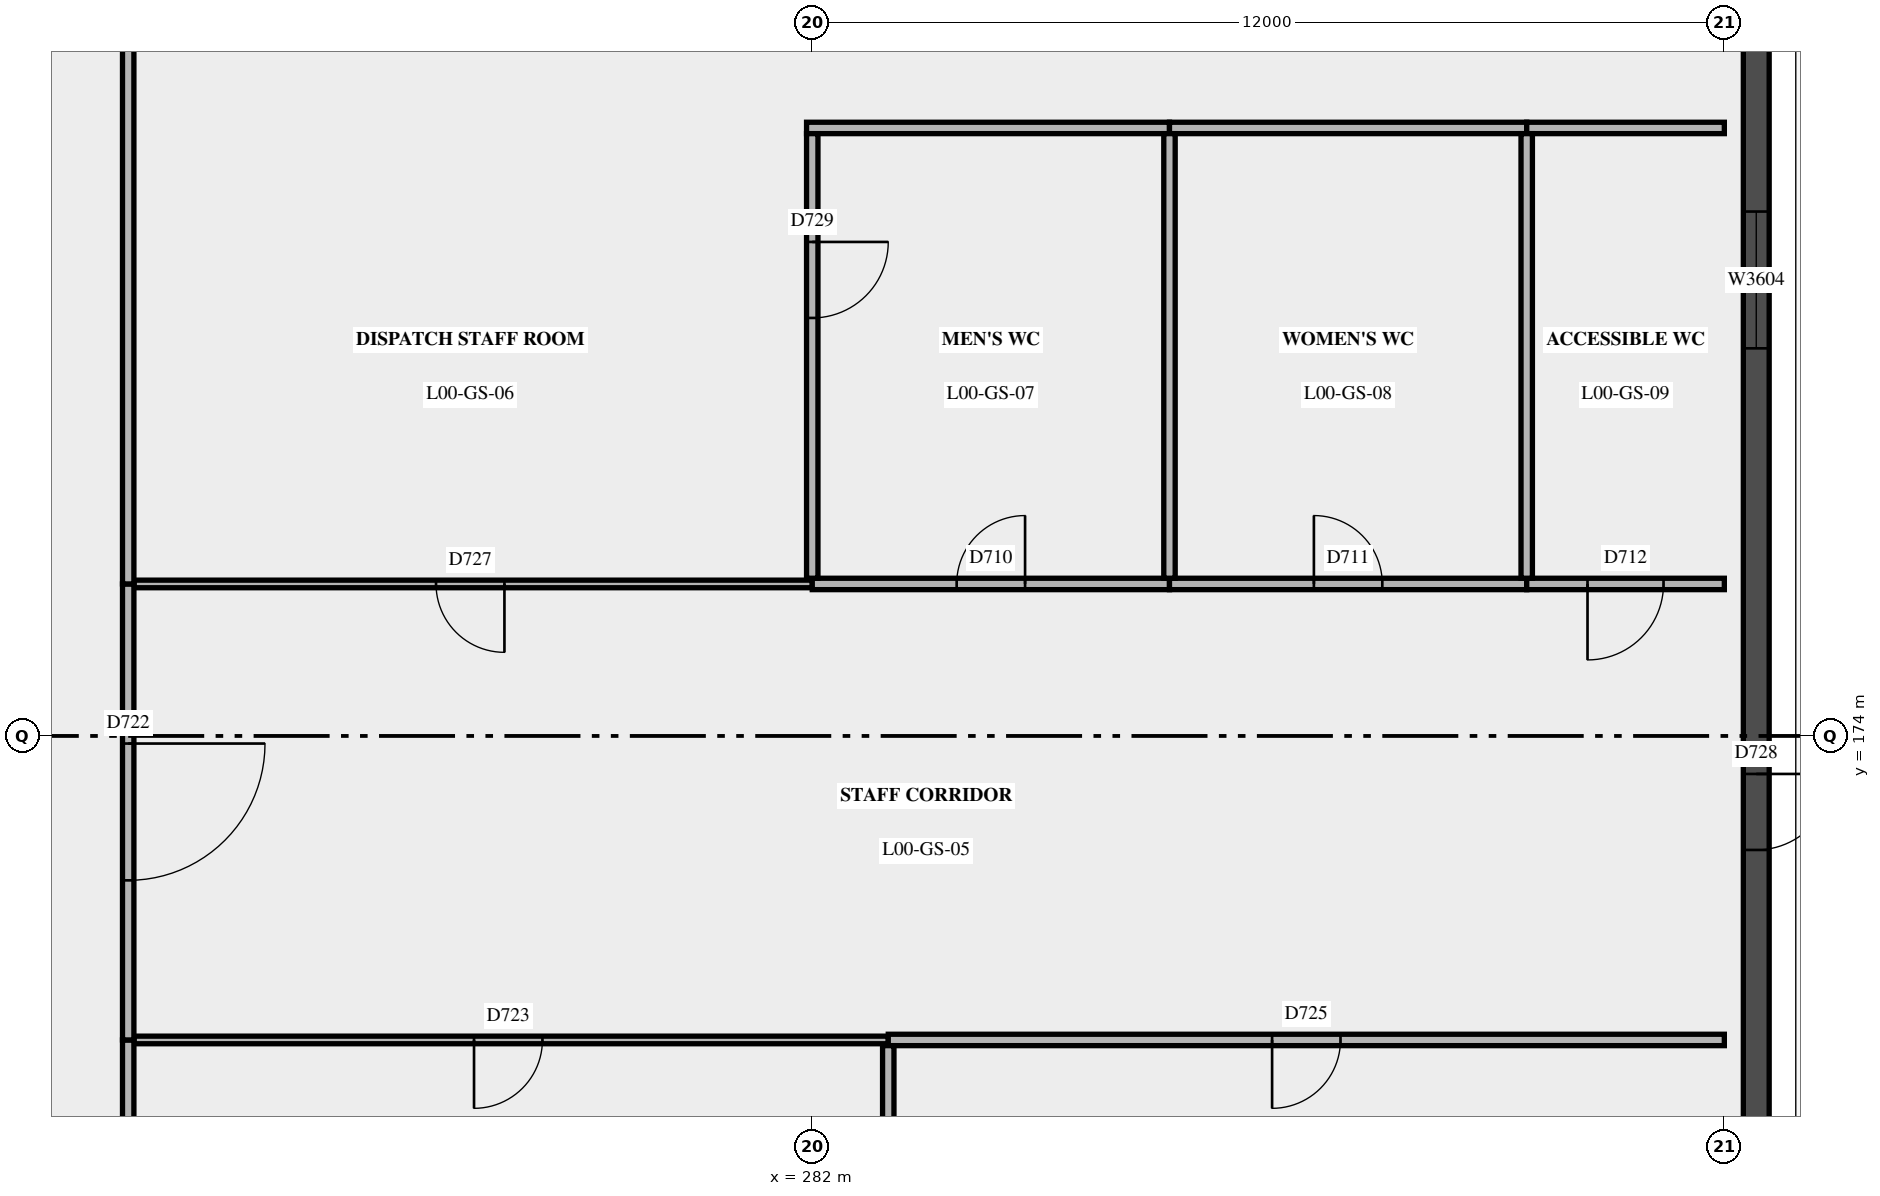
"""IFC4 building model, lengths in metres.
Left out: names, types, materials, properties, quantities, classifications, styles, units other than length and angle.
Written with IfcOpenShell. Run it as: python <this file> out.ifc"""

import sys

from ifc_helpers import new_model, si_unit, direction, frame, frame_2d, origin, place, context, subcontext, project, spatial, polyline, rectangle, outline, extrude, element, fill, save


model = new_model("IFC4")
c1 = context("Model", 3, precision=1e-05, world=origin(), true_north=direction((0.0, 1.0)))
c2 = subcontext(c1, "Body", "Model", "MODEL_VIEW")
j1 = project(units=[si_unit("LENGTHUNIT", "METRE"), si_unit("PLANEANGLEUNIT", "RADIAN")], contexts=[c1])
p1 = place(None, origin())
s1 = spatial("IfcSite", under=j1, at=p1, CompositionType="ELEMENT")
p2 = place(p1, origin())
s2 = spatial("IfcBuilding", under=s1, at=p2, CompositionType="ELEMENT")
p3 = place(p2, origin())
s3 = spatial("IfcBuildingStorey", under=s2, at=p3, CompositionType="ELEMENT", Elevation=0.0)
p4 = place(p3, frame((294.42, 161.75, 0.0), z_axis=(0.0, 0.0, 1.0), x_axis=(0.0, 1.0, 0.0)))
e1 = element("IfcWall", 1, at=p4, inside=s3, PredefinedType="SOLIDWALL", context=c2, shape_type="SweptSolid", body=[
    extrude(rectangle(XDim=24.5, YDim=0.34, at=frame_2d((12.25, 0.0))), origin(), (0.0, 0.0, 1.0), 5.4),
])
p5 = place(p4, frame((11.75, 0.0, 0.0), z_axis=(0.0, 0.0, 1.0), x_axis=(-1.0, 0.0, 0.0)))
e2 = element("IfcOpeningElement", 2, at=p5, cuts=e1, PredefinedType="OPENING", context=c2, shape_type="SweptSolid", body=[
    extrude(rectangle(XDim=1.0, YDim=2.1, at=frame_2d((0.5, 1.05))), frame((0.0, 0.18, 0.0), z_axis=(0.0, -1.0, 0.0), x_axis=(1.0, 0.0, 0.0)), (0.0, 0.0, 1.0), 0.36),
])
p6 = place(p4, frame((5.35, 0.0, 0.9)))
e3 = element("IfcOpeningElement", 3, at=p6, cuts=e1, PredefinedType="OPENING", context=c2, shape_type="SweptSolid", body=[
    extrude(rectangle(XDim=1.8, YDim=2.4, at=frame_2d((0.9, 1.2))), frame((0.0, 0.18, 0.0), z_axis=(0.0, -1.0, 0.0), x_axis=(1.0, 0.0, 0.0)), (0.0, 0.0, 1.0), 0.36),
])
p7 = place(p4, frame((17.35, 0.0, 0.9)))
e4 = element("IfcOpeningElement", 4, at=p7, cuts=e1, PredefinedType="OPENING", context=c2, shape_type="SweptSolid", body=[
    extrude(rectangle(XDim=1.8, YDim=2.4, at=frame_2d((0.9, 1.2))), frame((0.0, 0.18, 0.0), z_axis=(0.0, -1.0, 0.0), x_axis=(1.0, 0.0, 0.0)), (0.0, 0.0, 1.0), 0.36),
])
p8 = place(p3, frame((273.075, 170.0, 0.0), z_axis=(0.0, 0.0, 1.0), x_axis=(1.0, 0.0, 0.0)))
e5 = element("IfcWall", 5, at=p8, inside=s3, PredefinedType="PARTITIONING", context=c2, shape_type="SweptSolid", body=[
    extrude(rectangle(XDim=9.925, YDim=0.1, at=frame_2d((4.962, 0.0))), origin(), (0.0, 0.0, 1.0), 6.9),
])
p9 = place(p8, frame((4.475, 0.0, 0.0)))
e6 = element("IfcOpeningElement", 6, at=p9, cuts=e5, PredefinedType="OPENING", context=c2, shape_type="SweptSolid", body=[
    extrude(rectangle(XDim=0.9, YDim=2.1, at=frame_2d((0.45, 1.05))), frame((0.0, 0.06, 0.0), z_axis=(0.0, -1.0, 0.0), x_axis=(1.0, 0.0, 0.0)), (0.0, 0.0, 1.0), 0.12),
])
p10 = place(p3, frame((283.0, 170.0, 0.0), z_axis=(0.0, 0.0, 1.0), x_axis=(1.0, 0.0, 0.0)))
e7 = element("IfcWall", 7, at=p10, inside=s3, PredefinedType="PARTITIONING", context=c2, shape_type="SweptSolid", body=[
    extrude(rectangle(XDim=11.0, YDim=0.15, at=frame_2d((5.5, 0.0))), origin(), (0.0, 0.0, 1.0), 6.9),
])
p11 = place(p10, frame((5.05, 0.0, 0.0)))
e8 = element("IfcOpeningElement", 8, at=p11, cuts=e7, PredefinedType="OPENING", context=c2, shape_type="SweptSolid", body=[
    extrude(rectangle(XDim=0.9, YDim=2.1, at=frame_2d((0.45, 1.05))), frame((0.0, 0.085, 0.0), z_axis=(0.0, -1.0, 0.0), x_axis=(1.0, 0.0, 0.0)), (0.0, 0.0, 1.0), 0.17),
])
p12 = place(p3, frame((273.075, 176.0, 0.0), z_axis=(0.0, 0.0, 1.0), x_axis=(1.0, 0.0, 0.0)))
e9 = element("IfcWall", 9, at=p12, inside=s3, PredefinedType="PARTITIONING", context=c2, shape_type="SweptSolid", body=[
    extrude(rectangle(XDim=8.925, YDim=0.1, at=frame_2d((4.462, 0.0))), origin(), (0.0, 0.0, 1.0), 6.9),
])
p13 = place(p12, frame((3.975, 0.0, 0.0)))
e10 = element("IfcOpeningElement", 10, at=p13, cuts=e9, PredefinedType="OPENING", context=c2, shape_type="SweptSolid", body=[
    extrude(rectangle(XDim=0.9, YDim=2.1, at=frame_2d((0.45, 1.05))), frame((0.0, 0.06, 0.0), z_axis=(0.0, -1.0, 0.0), x_axis=(1.0, 0.0, 0.0)), (0.0, 0.0, 1.0), 0.12),
])
p14 = place(p3, frame((282.0, 176.0, 0.0), z_axis=(0.0, 0.0, 1.0), x_axis=(1.0, 0.0, 0.0)))
e11 = element("IfcWall", 11, at=p14, inside=s3, PredefinedType="PARTITIONING", context=c2, shape_type="SweptSolid", body=[
    extrude(rectangle(XDim=4.7, YDim=0.15, at=frame_2d((2.35, 0.0))), origin(), (0.0, 0.0, 1.0), 5.15),
])
p15 = place(p14, frame((1.9, 0.0, 0.0)))
e12 = element("IfcOpeningElement", 12, at=p15, cuts=e11, PredefinedType="OPENING", context=c2, shape_type="SweptSolid", body=[
    extrude(rectangle(XDim=0.9, YDim=2.1, at=frame_2d((0.45, 1.05))), frame((0.0, 0.085, 0.0), z_axis=(0.0, -1.0, 0.0), x_axis=(1.0, 0.0, 0.0)), (0.0, 0.0, 1.0), 0.17),
])
p16 = place(p3, frame((286.7, 176.0, 0.0), z_axis=(0.0, 0.0, 1.0), x_axis=(1.0, 0.0, 0.0)))
e13 = element("IfcWall", 13, at=p16, inside=s3, PredefinedType="PARTITIONING", context=c2, shape_type="SweptSolid", body=[
    extrude(rectangle(XDim=4.7, YDim=0.15, at=frame_2d((2.35, 0.0))), origin(), (0.0, 0.0, 1.0), 5.15),
])
p17 = place(p16, frame((1.9, 0.0, 0.0)))
e14 = element("IfcOpeningElement", 14, at=p17, cuts=e13, PredefinedType="OPENING", context=c2, shape_type="SweptSolid", body=[
    extrude(rectangle(XDim=0.9, YDim=2.1, at=frame_2d((0.45, 1.05))), frame((0.0, 0.085, 0.0), z_axis=(0.0, -1.0, 0.0), x_axis=(1.0, 0.0, 0.0)), (0.0, 0.0, 1.0), 0.17),
])
p18 = place(p3, frame((291.4, 176.0, 0.0), z_axis=(0.0, 0.0, 1.0), x_axis=(1.0, 0.0, 0.0)))
e15 = element("IfcWall", 15, at=p18, inside=s3, PredefinedType="PARTITIONING", context=c2, shape_type="SweptSolid", body=[
    extrude(rectangle(XDim=2.6, YDim=0.15, at=frame_2d((1.3, 0.0))), origin(), (0.0, 0.0, 1.0), 5.15),
])
p19 = place(p18, frame((0.8, 0.0, 0.0)))
e16 = element("IfcOpeningElement", 16, at=p19, cuts=e15, PredefinedType="OPENING", context=c2, shape_type="SweptSolid", body=[
    extrude(rectangle(XDim=1.0, YDim=2.1, at=frame_2d((0.5, 1.05))), frame((0.0, 0.085, 0.0), z_axis=(0.0, -1.0, 0.0), x_axis=(1.0, 0.0, 0.0)), (0.0, 0.0, 1.0), 0.17),
])
p20 = place(p3, frame((281.925, 182.0, 0.0), z_axis=(0.0, 0.0, 1.0), x_axis=(1.0, 0.0, 0.0)))
e17 = element("IfcWall", 17, at=p20, inside=s3, PredefinedType="PARTITIONING", context=c2, shape_type="SweptSolid", body=[
    extrude(rectangle(XDim=4.775, YDim=0.15, at=frame_2d((2.387, 0.0))), origin(), (0.0, 0.0, 1.0), 5.15),
])
p21 = place(p3, frame((286.7, 182.0, 0.0), z_axis=(0.0, 0.0, 1.0), x_axis=(1.0, 0.0, 0.0)))
e18 = element("IfcWall", 18, at=p21, inside=s3, PredefinedType="PARTITIONING", context=c2, shape_type="SweptSolid", body=[
    extrude(rectangle(XDim=4.7, YDim=0.15, at=frame_2d((2.35, 0.0))), origin(), (0.0, 0.0, 1.0), 5.15),
])
p22 = place(p3, frame((291.4, 182.0, 0.0), z_axis=(0.0, 0.0, 1.0), x_axis=(1.0, 0.0, 0.0)))
e19 = element("IfcWall", 19, at=p22, inside=s3, PredefinedType="PARTITIONING", context=c2, shape_type="SweptSolid", body=[
    extrude(rectangle(XDim=2.6, YDim=0.15, at=frame_2d((1.3, 0.0))), origin(), (0.0, 0.0, 1.0), 5.15),
])
p23 = place(p3, frame((273.0, 162.0, 0.0), z_axis=(0.0, 0.0, 1.0), x_axis=(0.0, 1.0, 0.0)))
e20 = element("IfcWall", 20, at=p23, inside=s3, PredefinedType="PARTITIONING", context=c2, shape_type="SweptSolid", body=[
    extrude(outline(polyline([(0.0, 0.0), (8.0, 0.0), (8.0, 6.9), (0.09, 6.9), (0.085, 5.927), (0.0, 5.927), (0.0, 0.0)])), frame((0.0, 0.075, 0.0), z_axis=(0.0, -1.0, 0.0), x_axis=(1.0, 0.0, 0.0)), (0.0, 0.0, 1.0), 0.15),
])
p24 = place(p3, frame((273.0, 170.0, 0.0), z_axis=(0.0, 0.0, 1.0), x_axis=(0.0, 1.0, 0.0)))
e21 = element("IfcWall", 21, at=p24, inside=s3, PredefinedType="PARTITIONING", context=c2, shape_type="SweptSolid", body=[
    extrude(rectangle(XDim=6.0, YDim=0.15, at=frame_2d((3.0, 0.0))), origin(), (0.0, 0.0, 1.0), 6.9),
])
p25 = place(p24, frame((2.1, 0.0, 0.0)))
e22 = element("IfcOpeningElement", 22, at=p25, cuts=e21, PredefinedType="OPENING", context=c2, shape_type="SweptSolid", body=[
    extrude(rectangle(XDim=1.8, YDim=2.1, at=frame_2d((0.9, 1.05))), frame((0.0, 0.085, 0.0), z_axis=(0.0, -1.0, 0.0), x_axis=(1.0, 0.0, 0.0)), (0.0, 0.0, 1.0), 0.17),
])
p26 = place(p3, frame((273.0, 176.0, 0.0), z_axis=(0.0, 0.0, 1.0), x_axis=(0.0, 1.0, 0.0)))
e23 = element("IfcWall", 23, at=p26, inside=s3, PredefinedType="PARTITIONING", context=c2, shape_type="SweptSolid", body=[
    extrude(outline(polyline([(0.0, 0.0), (10.0, 0.0), (10.0, 5.927), (9.915, 5.927), (9.91, 6.9), (0.0, 6.9), (0.0, 0.0)])), frame((0.0, 0.075, 0.0), z_axis=(0.0, -1.0, 0.0), x_axis=(1.0, 0.0, 0.0)), (0.0, 0.0, 1.0), 0.15),
])
p27 = place(p3, frame((282.0, 176.075, 0.0), z_axis=(0.0, 0.0, 1.0), x_axis=(0.0, 1.0, 0.0)))
e24 = element("IfcWall", 24, at=p27, inside=s3, PredefinedType="PARTITIONING", context=c2, shape_type="SweptSolid", body=[
    extrude(rectangle(XDim=5.85, YDim=0.15, at=frame_2d((2.925, 0.0))), origin(), (0.0, 0.0, 1.0), 5.15),
])
p28 = place(p27, frame((4.425, 0.0, 0.0), z_axis=(0.0, 0.0, 1.0), x_axis=(-1.0, 0.0, 0.0)))
e25 = element("IfcOpeningElement", 25, at=p28, cuts=e24, PredefinedType="OPENING", context=c2, shape_type="SweptSolid", body=[
    extrude(rectangle(XDim=1.0, YDim=2.1, at=frame_2d((0.5, 1.05))), frame((0.0, 0.085, 0.0), z_axis=(0.0, -1.0, 0.0), x_axis=(1.0, 0.0, 0.0)), (0.0, 0.0, 1.0), 0.17),
])
p29 = place(p3, frame((283.0, 162.0, 0.0), z_axis=(0.0, 0.0, 1.0), x_axis=(0.0, 1.0, 0.0)))
e26 = element("IfcWall", 26, at=p29, inside=s3, PredefinedType="PARTITIONING", context=c2, shape_type="SweptSolid", body=[
    extrude(outline(polyline([(0.0, 0.0), (7.925, 0.0), (7.925, 6.9), (0.09, 6.9), (0.085, 5.927), (0.0, 5.927), (0.0, 0.0)])), frame((0.0, 0.075, 0.0), z_axis=(0.0, -1.0, 0.0), x_axis=(1.0, 0.0, 0.0)), (0.0, 0.0, 1.0), 0.15),
])
for number, where, z_axis, x_axis in (
    (27, (286.7, 176.075, 0.0), (0.0, 0.0, 1.0), (0.0, 1.0, 0.0)),
    (28, (291.4, 176.075, 0.0), (0.0, 0.0, 1.0), (0.0, 1.0, 0.0)),
):
    element("IfcWall", number, at=place(p3, frame(where, z_axis=z_axis, x_axis=x_axis)), inside=s3, PredefinedType="PARTITIONING", context=c2, shape_type="SweptSolid", body=[
        extrude(rectangle(XDim=5.85, YDim=0.15, at=frame_2d((2.925, 0.0))), origin(), (0.0, 0.0, 1.0), 5.15),
    ])
p30 = place(p5, origin())
e29 = element("IfcDoor", 29, at=p30, inside=s3, OperationType="SINGLE_SWING_LEFT", PredefinedType="DOOR", context=c2, shape_type="SweptSolid", body=[
    extrude(rectangle(XDim=1.0, YDim=2.1, at=frame_2d((0.5, 1.05))), frame((0.0, 0.025, 0.0), z_axis=(0.0, -1.0, 0.0), x_axis=(1.0, 0.0, 0.0)), (0.0, 0.0, 1.0), 0.05),
])
fill(e2, e29)
p31 = place(p7, origin())
e30 = element("IfcWindow", 30, at=p31, inside=s3, PartitioningType="SINGLE_PANEL", PredefinedType="WINDOW", context=c2, shape_type="SweptSolid", body=[
    extrude(rectangle(XDim=1.8, YDim=2.4, at=frame_2d((0.9, 1.2))), frame((0.0, 0.03, 0.0), z_axis=(0.0, -1.0, 0.0), x_axis=(1.0, 0.0, 0.0)), (0.0, 0.0, 1.0), 0.06),
])
fill(e4, e30)
p32 = place(p15, origin())
e31 = element("IfcDoor", 31, at=p32, inside=s3, OperationType="SINGLE_SWING_RIGHT", PredefinedType="DOOR", context=c2, shape_type="SweptSolid", body=[
    extrude(rectangle(XDim=0.9, YDim=2.1, at=frame_2d((0.45, 1.05))), frame((0.0, 0.025, 0.0), z_axis=(0.0, -1.0, 0.0), x_axis=(1.0, 0.0, 0.0)), (0.0, 0.0, 1.0), 0.05),
])
fill(e12, e31)
p33 = place(p17, origin())
e32 = element("IfcDoor", 32, at=p33, inside=s3, OperationType="SINGLE_SWING_LEFT", PredefinedType="DOOR", context=c2, shape_type="SweptSolid", body=[
    extrude(rectangle(XDim=0.9, YDim=2.1, at=frame_2d((0.45, 1.05))), frame((0.0, 0.025, 0.0), z_axis=(0.0, -1.0, 0.0), x_axis=(1.0, 0.0, 0.0)), (0.0, 0.0, 1.0), 0.05),
])
fill(e14, e32)
p34 = place(p19, origin())
e33 = element("IfcDoor", 33, at=p34, inside=s3, OperationType="SINGLE_SWING_RIGHT", PredefinedType="DOOR", context=c2, shape_type="SweptSolid", body=[
    extrude(rectangle(XDim=1.0, YDim=2.1, at=frame_2d((0.5, 1.05))), frame((0.0, 0.025, 0.0), z_axis=(0.0, -1.0, 0.0), x_axis=(1.0, 0.0, 0.0)), (0.0, 0.0, 1.0), 0.05),
])
fill(e16, e33)
p35 = place(p25, origin())
e34 = element("IfcDoor", 34, at=p35, inside=s3, OperationType="DOUBLE_DOOR_SINGLE_SWING", PredefinedType="DOOR", context=c2, shape_type="SweptSolid", body=[
    extrude(rectangle(XDim=1.8, YDim=2.1, at=frame_2d((0.9, 1.05))), frame((0.0, 0.025, 0.0), z_axis=(0.0, -1.0, 0.0), x_axis=(1.0, 0.0, 0.0)), (0.0, 0.0, 1.0), 0.05),
])
fill(e22, e34)
p36 = place(p9, origin())
e35 = element("IfcDoor", 35, at=p36, inside=s3, OperationType="SINGLE_SWING_RIGHT", PredefinedType="DOOR", context=c2, shape_type="SweptSolid", body=[
    extrude(rectangle(XDim=0.9, YDim=2.1, at=frame_2d((0.45, 1.05))), frame((0.0, 0.025, 0.0), z_axis=(0.0, -1.0, 0.0), x_axis=(1.0, 0.0, 0.0)), (0.0, 0.0, 1.0), 0.05),
])
fill(e6, e35)
p37 = place(p11, origin())
e36 = element("IfcDoor", 36, at=p37, inside=s3, OperationType="SINGLE_SWING_RIGHT", PredefinedType="DOOR", context=c2, shape_type="SweptSolid", body=[
    extrude(rectangle(XDim=0.9, YDim=2.1, at=frame_2d((0.45, 1.05))), frame((0.0, 0.025, 0.0), z_axis=(0.0, -1.0, 0.0), x_axis=(1.0, 0.0, 0.0)), (0.0, 0.0, 1.0), 0.05),
])
fill(e8, e36)
p38 = place(p13, origin())
e37 = element("IfcDoor", 37, at=p38, inside=s3, OperationType="SINGLE_SWING_LEFT", PredefinedType="DOOR", context=c2, shape_type="SweptSolid", body=[
    extrude(rectangle(XDim=0.9, YDim=2.1, at=frame_2d((0.45, 1.05))), frame((0.0, 0.025, 0.0), z_axis=(0.0, -1.0, 0.0), x_axis=(1.0, 0.0, 0.0)), (0.0, 0.0, 1.0), 0.05),
])
fill(e10, e37)
p39 = place(p28, origin())
e38 = element("IfcDoor", 38, at=p39, inside=s3, OperationType="SINGLE_SWING_LEFT", PredefinedType="DOOR", context=c2, shape_type="SweptSolid", body=[
    extrude(rectangle(XDim=1.0, YDim=2.1, at=frame_2d((0.5, 1.05))), frame((0.0, 0.025, 0.0), z_axis=(0.0, -1.0, 0.0), x_axis=(1.0, 0.0, 0.0)), (0.0, 0.0, 1.0), 0.05),
])
fill(e25, e38)
save(model, sys.argv[1])
